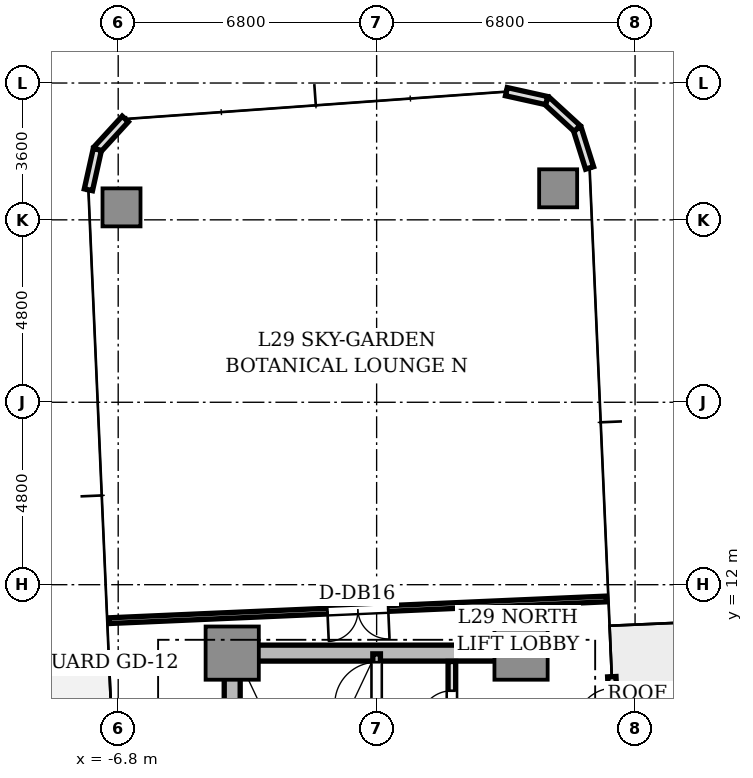
"""IFC4 building model, lengths in metres.
Left out: names, types, materials, properties, quantities, classifications, styles, units other than length and angle.
Written with IfcOpenShell. Run it as: python <this file> out.ifc"""

import sys

from ifc_helpers import new_model, si_unit, direction, frame, frame_2d, origin, origin_2d, place, context, subcontext, project, spatial, rectangle, extrude, source, transform, mapped, element, fill, save


model = new_model("IFC4")
c1 = context("Model", 3, precision=1e-05, world=origin(), true_north=direction((0.0, 1.0)))
c2 = subcontext(c1, "Body", "Model", "MODEL_VIEW")
j1 = project(units=[si_unit("LENGTHUNIT", "METRE"), si_unit("PLANEANGLEUNIT", "RADIAN")], contexts=[c1])
p1 = place(None, origin())
s1 = spatial("IfcSite", under=j1, at=p1, CompositionType="ELEMENT")
p2 = place(p1, origin())
s2 = spatial("IfcBuilding", under=s1, at=p2, CompositionType="ELEMENT")
p3 = place(p2, frame((0.0, 0.0, 106.95)))
s3 = spatial("IfcBuildingStorey", under=s2, at=p3, CompositionType="ELEMENT", Elevation=106.95)
p4 = place(p3, frame((-3.55, 10.2, 0.0), z_axis=(0.0, 0.0, 1.0), x_axis=(1.0, 0.0, 0.0)))
e1 = element("IfcWall", 1, at=p4, inside=s3, PredefinedType="SHEAR", context=c2, shape_type="SweptSolid", body=[
    extrude(rectangle(XDim=7.1, YDim=0.42, at=frame_2d((3.55, 0.0))), origin(), (0.0, 0.0, 1.0), 4.26),
])
p5 = place(p3, frame((-3.8, 2.85, 0.0), z_axis=(0.0, 0.0, 1.0), x_axis=(0.0, 1.0, 0.0)))
e2 = element("IfcWall", 2, at=p5, inside=s3, PredefinedType="SHEAR", context=c2, shape_type="SweptSolid", body=[
    extrude(rectangle(XDim=6.9, YDim=0.42, at=frame_2d((3.45, 0.0))), origin(), (0.0, 0.0, 1.0), 4.26),
])
m1 = source(origin(), c2, "Body", "SweptSolid", [
    extrude(rectangle(XDim=1.4, YDim=1.4, at=origin_2d()), origin(), (0.0, 0.0, 1.0), 4.26),
])
for number, where, z_axis, x_axis in (
    (3, (-3.8, 10.2, 0.0), (0.0, 0.0, 1.0), (1.0, 0.0, 0.0)),
    (4, (3.8, 10.2, 0.0), (0.0, 0.0, 1.0), (1.0, 0.0, 0.0)),
):
    element("IfcColumn", number, at=place(p3, frame(where, z_axis=z_axis, x_axis=x_axis)), inside=s3, PredefinedType="COLUMN", context=c2, shape_type="MappedRepresentation", body=[
        mapped(m1, transform((0.0, 0.0, 0.0), scale=1.0)),
    ])
m2 = source(origin(), c2, "Body", "SweptSolid", [
    extrude(rectangle(XDim=1.0, YDim=1.0, at=origin_2d()), origin(), (0.0, 0.0, 1.0), 4.26),
])
for number, where, z_axis, x_axis in (
    (5, (4.776, 22.43, 0.0), (0.0, 0.0, 1.0), (1.0, 0.0, 0.0)),
    (6, (-6.713, 21.928, 0.0), (0.0, 0.0, 1.0), (1.0, 0.0, 0.0)),
):
    element("IfcColumn", number, at=place(p3, frame(where, z_axis=z_axis, x_axis=x_axis)), inside=s3, PredefinedType="COLUMN", context=c2, shape_type="MappedRepresentation", body=[
        mapped(m2, transform((0.0, 0.0, 0.0), scale=1.0)),
    ])
p6 = place(p3, frame((6.306, 6.882, 0.0), z_axis=(0.0, 0.0, 1.0), x_axis=(-0.043672655174, 0.999045894436, 0.0)))
e7 = element("IfcWall", 7, at=p6, inside=s3, PredefinedType="STANDARD", context=c2, shape_type="SweptSolid", body=[
    extrude(rectangle(XDim=2.7, YDim=0.22, at=frame_2d((1.35, 0.0))), origin(), (0.0, 0.0, 1.0), 4.26),
])
p7 = place(p6, frame((1.4, 0.0, 0.0)))
e8 = element("IfcOpeningElement", 8, at=p7, cuts=e7, PredefinedType="OPENING", context=c2, shape_type="SweptSolid", body=[
    extrude(rectangle(XDim=1.0, YDim=2.2, at=frame_2d((0.5, 1.1))), frame((0.0, 0.12, 0.0), z_axis=(0.0, -1.0, 0.0), x_axis=(1.0, 0.0, 0.0)), (0.0, 0.0, 1.0), 0.24),
])
p8 = place(p3, frame((5.604, 22.966, 0.0), z_axis=(0.0, 0.0, 1.0), x_axis=(-0.300755105707, 0.953701403161, 0.0)))
e9 = element("IfcWall", 9, at=p8, inside=s3, PredefinedType="STANDARD", context=c2, shape_type="SweptSolid", body=[
    extrude(rectangle(XDim=1.087, YDim=0.22, at=frame_2d((0.543, 0.0))), origin(), (0.0, 0.0, 1.0), 4.26),
])
p9 = place(p3, frame((5.277, 24.003, 0.0), z_axis=(0.0, 0.0, 1.0), x_axis=(-0.737312600672, 0.675551721847, 0.0)))
e10 = element("IfcWall", 10, at=p9, inside=s3, PredefinedType="STANDARD", context=c2, shape_type="SweptSolid", body=[
    extrude(rectangle(XDim=1.087, YDim=0.22, at=frame_2d((0.543, 0.0))), origin(), (0.0, 0.0, 1.0), 4.26),
])
for number, where, z_axis, x_axis in (
    (11, (4.475, 24.737, 0.0), (0.0, 0.0, 1.0), (-0.976, 0.217, 0.0)),
    (12, (-6.614, 24.253, 0.0), (0.0, 0.0, 1.0), (-0.676, -0.737, 0.0)),
):
    element("IfcWall", number, at=place(p3, frame(where, z_axis=z_axis, x_axis=x_axis)), inside=s3, PredefinedType="STANDARD", context=c2, shape_type="SweptSolid", body=[
        extrude(rectangle(XDim=1.087, YDim=0.22, at=frame_2d((0.543, 0.0))), origin(), (0.0, 0.0, 1.0), 4.26),
    ])
p10 = place(p3, frame((-7.349, 23.452, 0.0), z_axis=(0.0, 0.0, 1.0), x_axis=(-0.216454939174, -0.976292609471, 0.0)))
e13 = element("IfcWall", 13, at=p10, inside=s3, PredefinedType="STANDARD", context=c2, shape_type="SweptSolid", body=[
    extrude(rectangle(XDim=1.087, YDim=0.22, at=frame_2d((0.544, 0.0))), origin(), (0.0, 0.0, 1.0), 4.26),
])
p11 = place(p3, frame((0.0, 2.5, 0.0), z_axis=(0.0, 0.0, 1.0), x_axis=(0.0, 1.0, 0.0)))
e14 = element("IfcWall", 14, at=p11, inside=s3, PredefinedType="SOLIDWALL", context=c2, shape_type="SweptSolid", body=[
    extrude(rectangle(XDim=7.68, YDim=0.2, at=frame_2d((3.84, 0.0))), origin(), (0.0, 0.0, 1.0), 4.26),
])
p12 = place(p11, frame((6.36, 0.0, 0.0)))
e15 = element("IfcOpeningElement", 15, at=p12, cuts=e14, PredefinedType="OPENING", context=c2, shape_type="SweptSolid", body=[
    extrude(rectangle(XDim=1.1, YDim=2.15, at=frame_2d((0.55, 1.075))), frame((0.0, 0.11, 0.0), z_axis=(0.0, -1.0, 0.0), x_axis=(1.0, 0.0, 0.0)), (0.0, 0.0, 1.0), 0.22),
])
p13 = place(p3, frame((1.98, 5.32, 0.0), z_axis=(0.0, 0.0, 1.0), x_axis=(0.0, 1.0, 0.0)))
e16 = element("IfcWall", 16, at=p13, inside=s3, PredefinedType="SOLIDWALL", context=c2, shape_type="SweptSolid", body=[
    extrude(rectangle(XDim=4.66, YDim=0.2, at=frame_2d((2.33, 0.0))), origin(), (0.0, 0.0, 1.0), 3.81),
])
p14 = place(p13, frame((3.04, 0.0, 0.0)))
e17 = element("IfcOpeningElement", 17, at=p14, cuts=e16, PredefinedType="OPENING", context=c2, shape_type="SweptSolid", body=[
    extrude(rectangle(XDim=0.85, YDim=2.1, at=frame_2d((0.425, 1.05))), frame((0.0, 0.11, 0.0), z_axis=(0.0, -1.0, 0.0), x_axis=(1.0, 0.0, 0.0)), (0.0, 0.0, 1.0), 0.22),
])
p15 = place(p3, frame((6.049, 11.625, 0.0), z_axis=(0.0, 0.0, 1.0), x_axis=(-0.999047806124, -0.043628901879, 0.0)))
e18 = element("IfcWall", 18, at=p15, inside=s3, PredefinedType="PARTITIONING", context=c2, shape_type="SweptSolid", body=[
    extrude(rectangle(XDim=13.1, YDim=0.15, at=frame_2d((6.55, 0.0))), origin(), (0.0, 0.0, 1.0), 3.81),
])
p16 = place(p15, frame((5.75, 0.0, 0.0)))
e19 = element("IfcOpeningElement", 19, at=p16, cuts=e18, PredefinedType="OPENING", context=c2, shape_type="SweptSolid", body=[
    extrude(rectangle(XDim=1.6, YDim=2.25, at=frame_2d((0.8, 1.125))), frame((0.0, 0.085, 0.0), z_axis=(0.0, -1.0, 0.0), x_axis=(1.0, 0.0, 0.0)), (0.0, 0.0, 1.0), 0.17),
])
m3 = source(origin(), c2, "Body", "SweptSolid", [
    extrude(rectangle(XDim=1.0, YDim=0.05, at=origin_2d()), origin(), (0.0, 0.0, 1.0), 2.2),
])
p17 = place(p7, frame((0.5, 0.0, 0.0)))
e20 = element("IfcDoor", 20, at=p17, inside=s3, OperationType="SINGLE_SWING_LEFT", PredefinedType="DOOR", context=c2, shape_type="MappedRepresentation", body=[
    mapped(m3, transform((0.0, 0.0, 0.0), scale=1.0)),
])
fill(e8, e20)
m4 = source(origin(), c2, "Body", "SweptSolid", [
    extrude(rectangle(XDim=1.1, YDim=0.05, at=origin_2d()), origin(), (0.0, 0.0, 1.0), 2.15),
])
p18 = place(p12, frame((0.55, 0.0, 0.0)))
e21 = element("IfcDoor", 21, at=p18, inside=s3, OperationType="SINGLE_SWING_LEFT", PredefinedType="DOOR", context=c2, shape_type="MappedRepresentation", body=[
    mapped(m4, transform((0.0, 0.0, 0.0), scale=1.0)),
])
fill(e15, e21)
m5 = source(origin(), c2, "Body", "SweptSolid", [
    extrude(rectangle(XDim=0.85, YDim=0.05, at=origin_2d()), origin(), (0.0, 0.0, 1.0), 2.1),
])
p19 = place(p14, frame((0.425, 0.0, 0.0)))
e22 = element("IfcDoor", 22, at=p19, inside=s3, OperationType="SINGLE_SWING_LEFT", PredefinedType="DOOR", context=c2, shape_type="MappedRepresentation", body=[
    mapped(m5, transform((0.0, 0.0, 0.0), scale=1.0)),
])
fill(e17, e22)
m6 = source(origin(), c2, "Body", "SweptSolid", [
    extrude(rectangle(XDim=1.6, YDim=0.05, at=origin_2d()), origin(), (0.0, 0.0, 1.0), 2.25),
])
p20 = place(p16, frame((0.8, 0.0, 0.0)))
e23 = element("IfcDoor", 23, at=p20, inside=s3, OperationType="DOUBLE_DOOR_SINGLE_SWING", PredefinedType="DOOR", context=c2, shape_type="MappedRepresentation", body=[
    mapped(m6, transform((0.0, 0.0, 0.0), scale=1.0)),
])
fill(e19, e23)
save(model, sys.argv[1])
